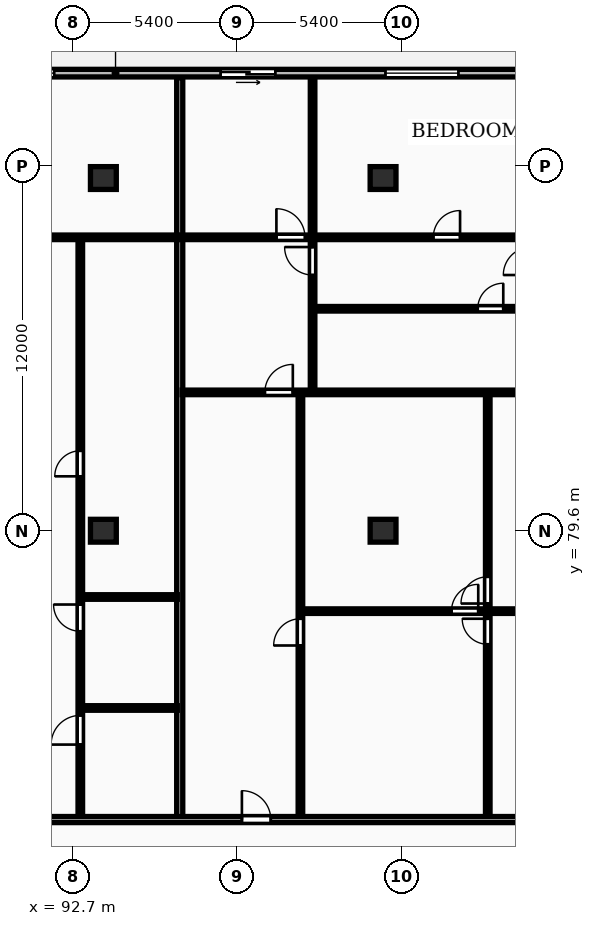
"""IFC4 building model, lengths in metres.
Left out: names, types, materials, properties, quantities, classifications, styles, units other than length and angle.
Written with IfcOpenShell. Run it as: python <this file> out.ifc"""

import sys

from ifc_helpers import new_model, si_unit, direction, frame, frame_2d, origin, origin_2d, place, context, subcontext, project, spatial, rectangle, extrude, element, fill, save


model = new_model("IFC4")
c1 = context("Model", 3, precision=1e-05, world=origin(), true_north=direction((0.0, 1.0)))
c2 = subcontext(c1, "Body", "Model", "MODEL_VIEW")
j1 = project(units=[si_unit("LENGTHUNIT", "METRE"), si_unit("PLANEANGLEUNIT", "RADIAN")], contexts=[c1])
p1 = place(None, origin())
s1 = spatial("IfcSite", under=j1, at=p1, CompositionType="ELEMENT")
p2 = place(p1, origin())
s2 = spatial("IfcBuilding", under=s1, at=p2, CompositionType="ELEMENT")
p3 = place(p2, frame((0.0, 0.0, 201.1)))
s3 = spatial("IfcBuildingStorey", under=s2, at=p3, CompositionType="ELEMENT", Elevation=201.1)
for number, where, z_axis, x_axis in (
    (1, (93.7, 79.6, 0.0), (0.0, 0.0, 1.0), (1.0, 0.0, 0.0)),
    (2, (93.7, 91.2, 0.0), (0.0, 0.0, 1.0), (1.0, 0.0, 0.0)),
    (3, (102.9, 79.6, 0.0), (0.0, 0.0, 1.0), (1.0, 0.0, 0.0)),
    (4, (102.9, 91.2, 0.0), (0.0, 0.0, 1.0), (1.0, 0.0, 0.0)),
):
    element("IfcColumn", number, at=place(p3, frame(where, z_axis=z_axis, x_axis=x_axis)), inside=s3, PredefinedType="COLUMN", context=c2, shape_type="SweptSolid", body=[
        extrude(rectangle(XDim=0.85, YDim=0.75, at=origin_2d()), origin(), (0.0, 0.0, 1.0), 3.25),
    ])
p4 = place(p3, frame((128.4, 94.65, 0.0), z_axis=(0.0, 0.0, 1.0), x_axis=(-1.0, 0.0, 0.0)))
e5 = element("IfcWall", 5, at=p4, inside=s3, PredefinedType="STANDARD", context=c2, shape_type="SweptSolid", body=[
    extrude(rectangle(XDim=68.6, YDim=0.25, at=frame_2d((34.3, 0.0))), origin(), (0.0, 0.0, 1.0), 2.97),
])
p5 = place(p4, frame((63.864, 0.0, 0.0)))
e6 = element("IfcOpeningElement", 6, at=p5, cuts=e5, PredefinedType="OPENING", context=c2, shape_type="SweptSolid", body=[
    extrude(rectangle(XDim=1.8, YDim=2.2, at=frame_2d((0.9, 1.1))), frame((0.0, 0.135, 0.0), z_axis=(0.0, -1.0, 0.0), x_axis=(1.0, 0.0, 0.0)), (0.0, 0.0, 1.0), 0.27),
])
p6 = place(p4, frame((54.713, 0.0, 0.85)))
e7 = element("IfcOpeningElement", 7, at=p6, cuts=e5, PredefinedType="OPENING", context=c2, shape_type="SweptSolid", body=[
    extrude(rectangle(XDim=2.4, YDim=1.9, at=frame_2d((1.2, 0.95))), frame((0.0, 0.135, 0.0), z_axis=(0.0, -1.0, 0.0), x_axis=(1.0, 0.0, 0.0)), (0.0, 0.0, 1.0), 0.27),
])
p7 = place(p4, frame((45.732, 0.0, 0.0)))
e8 = element("IfcOpeningElement", 8, at=p7, cuts=e5, PredefinedType="OPENING", context=c2, shape_type="SweptSolid", body=[
    extrude(rectangle(XDim=1.8, YDim=2.2, at=frame_2d((0.9, 1.1))), frame((0.0, 0.135, 0.0), z_axis=(0.0, -1.0, 0.0), x_axis=(1.0, 0.0, 0.0)), (0.0, 0.0, 1.0), 0.27),
])
p8 = place(p4, frame((36.318, 0.0, 0.85)))
e9 = element("IfcOpeningElement", 9, at=p8, cuts=e5, PredefinedType="OPENING", context=c2, shape_type="SweptSolid", body=[
    extrude(rectangle(XDim=2.4, YDim=1.9, at=frame_2d((1.2, 0.95))), frame((0.0, 0.135, 0.0), z_axis=(0.0, -1.0, 0.0), x_axis=(1.0, 0.0, 0.0)), (0.0, 0.0, 1.0), 0.27),
])
p9 = place(p4, frame((23.021, 0.0, 0.85)))
e10 = element("IfcOpeningElement", 10, at=p9, cuts=e5, PredefinedType="OPENING", context=c2, shape_type="SweptSolid", body=[
    extrude(rectangle(XDim=2.4, YDim=1.9, at=frame_2d((1.2, 0.95))), frame((0.0, 0.135, 0.0), z_axis=(0.0, -1.0, 0.0), x_axis=(1.0, 0.0, 0.0)), (0.0, 0.0, 1.0), 0.27),
])
p10 = place(p4, frame((29.043, 0.0, 0.0)))
e11 = element("IfcOpeningElement", 11, at=p10, cuts=e5, PredefinedType="OPENING", context=c2, shape_type="SweptSolid", body=[
    extrude(rectangle(XDim=1.8, YDim=2.2, at=frame_2d((0.9, 1.1))), frame((0.0, 0.135, 0.0), z_axis=(0.0, -1.0, 0.0), x_axis=(1.0, 0.0, 0.0)), (0.0, 0.0, 1.0), 0.27),
])
p11 = place(p4, frame((17.209, 0.0, 0.85)))
e12 = element("IfcOpeningElement", 12, at=p11, cuts=e5, PredefinedType="OPENING", context=c2, shape_type="SweptSolid", body=[
    extrude(rectangle(XDim=2.4, YDim=1.9, at=frame_2d((1.2, 0.95))), frame((0.0, 0.135, 0.0), z_axis=(0.0, -1.0, 0.0), x_axis=(1.0, 0.0, 0.0)), (0.0, 0.0, 1.0), 0.27),
])
p12 = place(p4, frame((6.712, 0.0, 0.85)))
e13 = element("IfcOpeningElement", 13, at=p12, cuts=e5, PredefinedType="OPENING", context=c2, shape_type="SweptSolid", body=[
    extrude(rectangle(XDim=2.4, YDim=1.9, at=frame_2d((1.2, 0.95))), frame((0.0, 0.135, 0.0), z_axis=(0.0, -1.0, 0.0), x_axis=(1.0, 0.0, 0.0)), (0.0, 0.0, 1.0), 0.27),
])
p13 = place(p4, frame((12.824, 0.0, 0.0)))
e14 = element("IfcOpeningElement", 14, at=p13, cuts=e5, PredefinedType="OPENING", context=c2, shape_type="SweptSolid", body=[
    extrude(rectangle(XDim=1.8, YDim=2.2, at=frame_2d((0.9, 1.1))), frame((0.0, 0.135, 0.0), z_axis=(0.0, -1.0, 0.0), x_axis=(1.0, 0.0, 0.0)), (0.0, 0.0, 1.0), 0.27),
])
p14 = place(p4, frame((1.025, 0.0, 0.85)))
e15 = element("IfcOpeningElement", 15, at=p14, cuts=e5, PredefinedType="OPENING", context=c2, shape_type="SweptSolid", body=[
    extrude(rectangle(XDim=2.4, YDim=1.9, at=frame_2d((1.2, 0.95))), frame((0.0, 0.135, 0.0), z_axis=(0.0, -1.0, 0.0), x_axis=(1.0, 0.0, 0.0)), (0.0, 0.0, 1.0), 0.27),
])
p15 = place(p3, frame((96.212, 70.18, 0.0), z_axis=(0.0, 0.0, 1.0), x_axis=(0.0, 1.0, 0.0)))
e16 = element("IfcWall", 16, at=p15, inside=s3, PredefinedType="PARTITIONING", context=c2, shape_type="SweptSolid", body=[
    extrude(rectangle(XDim=24.32, YDim=0.2, at=frame_2d((12.16, 0.0))), origin(), (0.0, 0.0, 1.0), 2.97),
])
for number, where, z_axis, x_axis in (
    (17, (93.002, 73.77, 0.0), (0.0, 0.0, 1.0), (1.0, 0.0, 0.0)),
    (18, (93.002, 77.42, 0.0), (0.0, 0.0, 1.0), (1.0, 0.0, 0.0)),
):
    element("IfcWall", number, at=place(p3, frame(where, z_axis=z_axis, x_axis=x_axis)), inside=s3, PredefinedType="PARTITIONING", context=c2, shape_type="SweptSolid", body=[
        extrude(rectangle(XDim=3.13, YDim=0.15, at=frame_2d((1.565, 0.0))), origin(), (0.0, 0.0, 1.0), 2.97),
    ])
p16 = place(p3, frame((92.942, 70.16, 0.0), z_axis=(0.0, 0.0, 1.0), x_axis=(0.0, 1.0, 0.0)))
e19 = element("IfcWall", 19, at=p16, inside=s3, PredefinedType="PARTITIONING", context=c2, shape_type="SweptSolid", body=[
    extrude(rectangle(XDim=19.03, YDim=0.15, at=frame_2d((9.515, 0.0))), origin(), (0.0, 0.0, 1.0), 2.97),
])
p17 = place(p16, frame((2.406, 0.0, 0.0)))
e20 = element("IfcOpeningElement", 20, at=p17, cuts=e19, PredefinedType="OPENING", context=c2, shape_type="SweptSolid", body=[
    extrude(rectangle(XDim=0.96, YDim=2.1, at=frame_2d((0.48, 1.05))), frame((0.0, 0.085, 0.0), z_axis=(0.0, -1.0, 0.0), x_axis=(1.0, 0.0, 0.0)), (0.0, 0.0, 1.0), 0.17),
])
p18 = place(p16, frame((6.133, 0.0, 0.0)))
e21 = element("IfcOpeningElement", 21, at=p18, cuts=e19, PredefinedType="OPENING", context=c2, shape_type="SweptSolid", body=[
    extrude(rectangle(XDim=0.88, YDim=2.06, at=frame_2d((0.44, 1.03))), frame((0.0, 0.085, 0.0), z_axis=(0.0, -1.0, 0.0), x_axis=(1.0, 0.0, 0.0)), (0.0, 0.0, 1.0), 0.17),
])
p19 = place(p16, frame((11.229, 0.0, 0.0)))
e22 = element("IfcOpeningElement", 22, at=p19, cuts=e19, PredefinedType="OPENING", context=c2, shape_type="SweptSolid", body=[
    extrude(rectangle(XDim=0.84, YDim=2.04, at=frame_2d((0.42, 1.02))), frame((0.0, 0.085, 0.0), z_axis=(0.0, -1.0, 0.0), x_axis=(1.0, 0.0, 0.0)), (0.0, 0.0, 1.0), 0.17),
])
p20 = place(p3, frame((77.823, 89.25, 0.0), z_axis=(0.0, 0.0, 1.0), x_axis=(1.0, 0.0, 0.0)))
e23 = element("IfcWall", 23, at=p20, inside=s3, PredefinedType="PARTITIONING", context=c2, shape_type="SweptSolid", body=[
    extrude(rectangle(XDim=18.308, YDim=0.15, at=frame_2d((9.154, 0.0))), origin(), (0.0, 0.0, 1.0), 2.97),
])
p21 = place(p20, frame((4.095, 0.0, 0.0)))
e24 = element("IfcOpeningElement", 24, at=p21, cuts=e23, PredefinedType="OPENING", context=c2, shape_type="SweptSolid", body=[
    extrude(rectangle(XDim=0.94, YDim=2.1, at=frame_2d((0.47, 1.05))), frame((0.0, 0.085, 0.0), z_axis=(0.0, -1.0, 0.0), x_axis=(1.0, 0.0, 0.0)), (0.0, 0.0, 1.0), 0.17),
])
p22 = place(p20, frame((8.684, 0.0, 0.0)))
e25 = element("IfcOpeningElement", 25, at=p22, cuts=e23, PredefinedType="OPENING", context=c2, shape_type="SweptSolid", body=[
    extrude(rectangle(XDim=0.94, YDim=2.1, at=frame_2d((0.47, 1.05))), frame((0.0, 0.085, 0.0), z_axis=(0.0, -1.0, 0.0), x_axis=(1.0, 0.0, 0.0)), (0.0, 0.0, 1.0), 0.17),
])
p23 = place(p3, frame((106.344, 70.16, 0.0), z_axis=(0.0, 0.0, 1.0), x_axis=(0.0, 1.0, 0.0)))
e26 = element("IfcWall", 26, at=p23, inside=s3, PredefinedType="PARTITIONING", context=c2, shape_type="SweptSolid", body=[
    extrude(rectangle(XDim=13.95, YDim=0.15, at=frame_2d((6.975, 0.0))), origin(), (0.0, 0.0, 1.0), 2.97),
])
p24 = place(p23, frame((5.705, 0.0, 0.0)))
e27 = element("IfcOpeningElement", 27, at=p24, cuts=e26, PredefinedType="OPENING", context=c2, shape_type="SweptSolid", body=[
    extrude(rectangle(XDim=0.84, YDim=2.04, at=frame_2d((0.42, 1.02))), frame((0.0, 0.085, 0.0), z_axis=(0.0, -1.0, 0.0), x_axis=(1.0, 0.0, 0.0)), (0.0, 0.0, 1.0), 0.17),
])
p25 = place(p23, frame((7.045, 0.0, 0.0)))
e28 = element("IfcOpeningElement", 28, at=p25, cuts=e26, PredefinedType="OPENING", context=c2, shape_type="SweptSolid", body=[
    extrude(rectangle(XDim=0.88, YDim=2.06, at=frame_2d((0.44, 1.03))), frame((0.0, 0.085, 0.0), z_axis=(0.0, -1.0, 0.0), x_axis=(1.0, 0.0, 0.0)), (0.0, 0.0, 1.0), 0.17),
])
p26 = place(p3, frame((100.242, 76.955, 0.0), z_axis=(0.0, 0.0, 1.0), x_axis=(1.0, 0.0, 0.0)))
e29 = element("IfcWall", 29, at=p26, inside=s3, PredefinedType="PARTITIONING", context=c2, shape_type="SweptSolid", body=[
    extrude(rectangle(XDim=12.004, YDim=0.15, at=frame_2d((6.002, 0.0))), origin(), (0.0, 0.0, 1.0), 2.97),
])
p27 = place(p26, frame((4.909, 0.0, 0.0)))
e30 = element("IfcOpeningElement", 30, at=p27, cuts=e29, PredefinedType="OPENING", context=c2, shape_type="SweptSolid", body=[
    extrude(rectangle(XDim=0.88, YDim=2.06, at=frame_2d((0.44, 1.03))), frame((0.0, 0.085, 0.0), z_axis=(0.0, -1.0, 0.0), x_axis=(1.0, 0.0, 0.0)), (0.0, 0.0, 1.0), 0.17),
])
p28 = place(p3, frame((100.182, 70.16, 0.0), z_axis=(0.0, 0.0, 1.0), x_axis=(0.0, 1.0, 0.0)))
e31 = element("IfcWall", 31, at=p28, inside=s3, PredefinedType="PARTITIONING", context=c2, shape_type="SweptSolid", body=[
    extrude(rectangle(XDim=13.95, YDim=0.15, at=frame_2d((6.975, 0.0))), origin(), (0.0, 0.0, 1.0), 2.97),
])
p29 = place(p28, frame((5.665, 0.0, 0.0)))
e32 = element("IfcOpeningElement", 32, at=p29, cuts=e31, PredefinedType="OPENING", context=c2, shape_type="SweptSolid", body=[
    extrude(rectangle(XDim=0.88, YDim=2.06, at=frame_2d((0.44, 1.03))), frame((0.0, 0.085, 0.0), z_axis=(0.0, -1.0, 0.0), x_axis=(1.0, 0.0, 0.0)), (0.0, 0.0, 1.0), 0.17),
])
p30 = place(p3, frame((100.582, 84.19, 0.0), z_axis=(0.0, 0.0, 1.0), x_axis=(0.0, 1.0, 0.0)))
e33 = element("IfcWall", 33, at=p30, inside=s3, PredefinedType="PARTITIONING", context=c2, shape_type="SweptSolid", body=[
    extrude(rectangle(XDim=10.31, YDim=0.15, at=frame_2d((5.155, 0.0))), origin(), (0.0, 0.0, 1.0), 2.97),
])
p31 = place(p30, frame((3.82, 0.0, 0.0)))
e34 = element("IfcOpeningElement", 34, at=p31, cuts=e33, PredefinedType="OPENING", context=c2, shape_type="SweptSolid", body=[
    extrude(rectangle(XDim=0.92, YDim=2.08, at=frame_2d((0.46, 1.04))), frame((0.0, 0.085, 0.0), z_axis=(0.0, -1.0, 0.0), x_axis=(1.0, 0.0, 0.0)), (0.0, 0.0, 1.0), 0.17),
])
p32 = place(p3, frame((100.622, 86.9, 0.0), z_axis=(0.0, 0.0, 1.0), x_axis=(1.0, 0.0, 0.0)))
e35 = element("IfcWall", 35, at=p32, inside=s3, PredefinedType="PARTITIONING", context=c2, shape_type="SweptSolid", body=[
    extrude(rectangle(XDim=11.624, YDim=0.15, at=frame_2d((5.812, 0.0))), origin(), (0.0, 0.0, 1.0), 2.97),
])
p33 = place(p32, frame((5.392, 0.0, 0.0)))
e36 = element("IfcOpeningElement", 36, at=p33, cuts=e35, PredefinedType="OPENING", context=c2, shape_type="SweptSolid", body=[
    extrude(rectangle(XDim=0.84, YDim=2.04, at=frame_2d((0.42, 1.02))), frame((0.0, 0.085, 0.0), z_axis=(0.0, -1.0, 0.0), x_axis=(1.0, 0.0, 0.0)), (0.0, 0.0, 1.0), 0.17),
])
p34 = place(p32, frame((7.404, 0.0, 0.0)))
e37 = element("IfcOpeningElement", 37, at=p34, cuts=e35, PredefinedType="OPENING", context=c2, shape_type="SweptSolid", body=[
    extrude(rectangle(XDim=0.84, YDim=2.04, at=frame_2d((0.42, 1.02))), frame((0.0, 0.085, 0.0), z_axis=(0.0, -1.0, 0.0), x_axis=(1.0, 0.0, 0.0)), (0.0, 0.0, 1.0), 0.17),
])
p35 = place(p3, frame((96.292, 84.15, 0.0), z_axis=(0.0, 0.0, 1.0), x_axis=(1.0, 0.0, 0.0)))
e38 = element("IfcWall", 38, at=p35, inside=s3, PredefinedType="PARTITIONING", context=c2, shape_type="SweptSolid", body=[
    extrude(rectangle(XDim=15.954, YDim=0.15, at=frame_2d((7.977, 0.0))), origin(), (0.0, 0.0, 1.0), 2.97),
])
p36 = place(p35, frame((2.72, 0.0, 0.0)))
e39 = element("IfcOpeningElement", 39, at=p36, cuts=e38, PredefinedType="OPENING", context=c2, shape_type="SweptSolid", body=[
    extrude(rectangle(XDim=0.92, YDim=2.08, at=frame_2d((0.46, 1.04))), frame((0.0, 0.085, 0.0), z_axis=(0.0, -1.0, 0.0), x_axis=(1.0, 0.0, 0.0)), (0.0, 0.0, 1.0), 0.17),
])
p37 = place(p3, frame((96.292, 89.25, 0.0), z_axis=(0.0, 0.0, 1.0), x_axis=(1.0, 0.0, 0.0)))
e40 = element("IfcWall", 40, at=p37, inside=s3, PredefinedType="PARTITIONING", context=c2, shape_type="SweptSolid", body=[
    extrude(rectangle(XDim=11.484, YDim=0.15, at=frame_2d((5.742, 0.0))), origin(), (0.0, 0.0, 1.0), 2.97),
])
p38 = place(p37, frame((3.1, 0.0, 0.0)))
e41 = element("IfcOpeningElement", 41, at=p38, cuts=e40, PredefinedType="OPENING", context=c2, shape_type="SweptSolid", body=[
    extrude(rectangle(XDim=0.94, YDim=2.1, at=frame_2d((0.47, 1.05))), frame((0.0, 0.085, 0.0), z_axis=(0.0, -1.0, 0.0), x_axis=(1.0, 0.0, 0.0)), (0.0, 0.0, 1.0), 0.17),
])
p39 = place(p37, frame((8.261, 0.0, 0.0)))
e42 = element("IfcOpeningElement", 42, at=p39, cuts=e40, PredefinedType="OPENING", context=c2, shape_type="SweptSolid", body=[
    extrude(rectangle(XDim=0.88, YDim=2.06, at=frame_2d((0.44, 1.03))), frame((0.0, 0.085, 0.0), z_axis=(0.0, -1.0, 0.0), x_axis=(1.0, 0.0, 0.0)), (0.0, 0.0, 1.0), 0.17),
])
p40 = place(p3, frame((59.8, 70.1, 0.0), z_axis=(0.0, 0.0, 1.0), x_axis=(1.0, 0.0, 0.0)))
e43 = element("IfcWall", 43, at=p40, inside=s3, PredefinedType="PARTITIONING", context=c2, shape_type="SweptSolid", body=[
    extrude(rectangle(XDim=68.6, YDim=0.2, at=frame_2d((34.3, 0.0))), origin(), (0.0, 0.0, 1.0), 2.97),
])
p41 = place(p40, frame((7.281, 0.0, 0.0)))
e44 = element("IfcOpeningElement", 44, at=p41, cuts=e43, PredefinedType="OPENING", context=c2, shape_type="SweptSolid", body=[
    extrude(rectangle(XDim=1.22, YDim=2.18, at=frame_2d((0.61, 1.09))), frame((0.0, 0.11, 0.0), z_axis=(0.0, -1.0, 0.0), x_axis=(1.0, 0.0, 0.0)), (0.0, 0.0, 1.0), 0.22),
])
p42 = place(p40, frame((25.602, 0.0, 0.0)))
e45 = element("IfcOpeningElement", 45, at=p42, cuts=e43, PredefinedType="OPENING", context=c2, shape_type="SweptSolid", body=[
    extrude(rectangle(XDim=1.22, YDim=2.18, at=frame_2d((0.61, 1.09))), frame((0.0, 0.11, 0.0), z_axis=(0.0, -1.0, 0.0), x_axis=(1.0, 0.0, 0.0)), (0.0, 0.0, 1.0), 0.22),
])
p43 = place(p40, frame((38.457, 0.0, 0.0)))
e46 = element("IfcOpeningElement", 46, at=p43, cuts=e43, PredefinedType="OPENING", context=c2, shape_type="SweptSolid", body=[
    extrude(rectangle(XDim=0.95, YDim=2.15, at=frame_2d((0.475, 1.075))), frame((0.0, 0.11, 0.0), z_axis=(0.0, -1.0, 0.0), x_axis=(1.0, 0.0, 0.0)), (0.0, 0.0, 1.0), 0.22),
])
p44 = place(p40, frame((54.571, 0.0, 0.0)))
e47 = element("IfcOpeningElement", 47, at=p44, cuts=e43, PredefinedType="OPENING", context=c2, shape_type="SweptSolid", body=[
    extrude(rectangle(XDim=0.95, YDim=2.15, at=frame_2d((0.475, 1.075))), frame((0.0, 0.11, 0.0), z_axis=(0.0, -1.0, 0.0), x_axis=(1.0, 0.0, 0.0)), (0.0, 0.0, 1.0), 0.22),
])
p45 = place(p8, origin())
e48 = element("IfcWindow", 48, at=p45, inside=s3, PartitioningType="DOUBLE_PANEL_VERTICAL", PredefinedType="WINDOW", context=c2, shape_type="SweptSolid", body=[
    extrude(rectangle(XDim=2.4, YDim=1.9, at=frame_2d((1.2, 0.95))), frame((0.0, 0.03, 0.0), z_axis=(0.0, -1.0, 0.0), x_axis=(1.0, 0.0, 0.0)), (0.0, 0.0, 1.0), 0.06),
])
fill(e9, e48)
p46 = place(p9, origin())
e49 = element("IfcWindow", 49, at=p46, inside=s3, PartitioningType="DOUBLE_PANEL_VERTICAL", PredefinedType="WINDOW", context=c2, shape_type="SweptSolid", body=[
    extrude(rectangle(XDim=2.4, YDim=1.9, at=frame_2d((1.2, 0.95))), frame((0.0, 0.03, 0.0), z_axis=(0.0, -1.0, 0.0), x_axis=(1.0, 0.0, 0.0)), (0.0, 0.0, 1.0), 0.06),
])
fill(e10, e49)
p47 = place(p10, origin())
e50 = element("IfcDoor", 50, at=p47, inside=s3, OperationType="SLIDING_TO_LEFT", PredefinedType="DOOR", context=c2, shape_type="SweptSolid", body=[
    extrude(rectangle(XDim=1.8, YDim=2.2, at=frame_2d((0.9, 1.1))), frame((0.0, 0.025, 0.0), z_axis=(0.0, -1.0, 0.0), x_axis=(1.0, 0.0, 0.0)), (0.0, 0.0, 1.0), 0.05),
])
fill(e11, e50)
p48 = place(p17, origin())
e51 = element("IfcDoor", 51, at=p48, inside=s3, OperationType="SINGLE_SWING_LEFT", PredefinedType="DOOR", context=c2, shape_type="SweptSolid", body=[
    extrude(rectangle(XDim=0.96, YDim=2.1, at=frame_2d((0.48, 1.05))), frame((0.0, 0.025, 0.0), z_axis=(0.0, -1.0, 0.0), x_axis=(1.0, 0.0, 0.0)), (0.0, 0.0, 1.0), 0.05),
])
fill(e20, e51)
p49 = place(p18, origin())
e52 = element("IfcDoor", 52, at=p49, inside=s3, OperationType="SINGLE_SWING_RIGHT", PredefinedType="DOOR", context=c2, shape_type="SweptSolid", body=[
    extrude(rectangle(XDim=0.88, YDim=2.06, at=frame_2d((0.44, 1.03))), frame((0.0, 0.025, 0.0), z_axis=(0.0, -1.0, 0.0), x_axis=(1.0, 0.0, 0.0)), (0.0, 0.0, 1.0), 0.05),
])
fill(e21, e52)
p50 = place(p19, origin())
e53 = element("IfcDoor", 53, at=p50, inside=s3, OperationType="SINGLE_SWING_LEFT", PredefinedType="DOOR", context=c2, shape_type="SweptSolid", body=[
    extrude(rectangle(XDim=0.84, YDim=2.04, at=frame_2d((0.42, 1.02))), frame((0.0, 0.025, 0.0), z_axis=(0.0, -1.0, 0.0), x_axis=(1.0, 0.0, 0.0)), (0.0, 0.0, 1.0), 0.05),
])
fill(e22, e53)
p51 = place(p24, origin())
e54 = element("IfcDoor", 54, at=p51, inside=s3, OperationType="SINGLE_SWING_RIGHT", PredefinedType="DOOR", context=c2, shape_type="SweptSolid", body=[
    extrude(rectangle(XDim=0.84, YDim=2.04, at=frame_2d((0.42, 1.02))), frame((0.0, 0.025, 0.0), z_axis=(0.0, -1.0, 0.0), x_axis=(1.0, 0.0, 0.0)), (0.0, 0.0, 1.0), 0.05),
])
fill(e27, e54)
p52 = place(p25, origin())
e55 = element("IfcDoor", 55, at=p52, inside=s3, OperationType="SINGLE_SWING_LEFT", PredefinedType="DOOR", context=c2, shape_type="SweptSolid", body=[
    extrude(rectangle(XDim=0.88, YDim=2.06, at=frame_2d((0.44, 1.03))), frame((0.0, 0.025, 0.0), z_axis=(0.0, -1.0, 0.0), x_axis=(1.0, 0.0, 0.0)), (0.0, 0.0, 1.0), 0.05),
])
fill(e28, e55)
p53 = place(p27, origin())
e56 = element("IfcDoor", 56, at=p53, inside=s3, OperationType="SINGLE_SWING_RIGHT", PredefinedType="DOOR", context=c2, shape_type="SweptSolid", body=[
    extrude(rectangle(XDim=0.88, YDim=2.06, at=frame_2d((0.44, 1.03))), frame((0.0, 0.025, 0.0), z_axis=(0.0, -1.0, 0.0), x_axis=(1.0, 0.0, 0.0)), (0.0, 0.0, 1.0), 0.05),
])
fill(e30, e56)
p54 = place(p29, origin())
e57 = element("IfcDoor", 57, at=p54, inside=s3, OperationType="SINGLE_SWING_LEFT", PredefinedType="DOOR", context=c2, shape_type="SweptSolid", body=[
    extrude(rectangle(XDim=0.88, YDim=2.06, at=frame_2d((0.44, 1.03))), frame((0.0, 0.025, 0.0), z_axis=(0.0, -1.0, 0.0), x_axis=(1.0, 0.0, 0.0)), (0.0, 0.0, 1.0), 0.05),
])
fill(e32, e57)
p55 = place(p31, origin())
e58 = element("IfcDoor", 58, at=p55, inside=s3, OperationType="SINGLE_SWING_RIGHT", PredefinedType="DOOR", context=c2, shape_type="SweptSolid", body=[
    extrude(rectangle(XDim=0.92, YDim=2.08, at=frame_2d((0.46, 1.04))), frame((0.0, 0.025, 0.0), z_axis=(0.0, -1.0, 0.0), x_axis=(1.0, 0.0, 0.0)), (0.0, 0.0, 1.0), 0.05),
])
fill(e34, e58)
p56 = place(p33, origin())
e59 = element("IfcDoor", 59, at=p56, inside=s3, OperationType="SINGLE_SWING_RIGHT", PredefinedType="DOOR", context=c2, shape_type="SweptSolid", body=[
    extrude(rectangle(XDim=0.84, YDim=2.04, at=frame_2d((0.42, 1.02))), frame((0.0, 0.025, 0.0), z_axis=(0.0, -1.0, 0.0), x_axis=(1.0, 0.0, 0.0)), (0.0, 0.0, 1.0), 0.05),
])
fill(e36, e59)
p57 = place(p36, origin())
e60 = element("IfcDoor", 60, at=p57, inside=s3, OperationType="SINGLE_SWING_RIGHT", PredefinedType="DOOR", context=c2, shape_type="SweptSolid", body=[
    extrude(rectangle(XDim=0.92, YDim=2.08, at=frame_2d((0.46, 1.04))), frame((0.0, 0.025, 0.0), z_axis=(0.0, -1.0, 0.0), x_axis=(1.0, 0.0, 0.0)), (0.0, 0.0, 1.0), 0.05),
])
fill(e39, e60)
p58 = place(p38, origin())
e61 = element("IfcDoor", 61, at=p58, inside=s3, OperationType="SINGLE_SWING_LEFT", PredefinedType="DOOR", context=c2, shape_type="SweptSolid", body=[
    extrude(rectangle(XDim=0.94, YDim=2.1, at=frame_2d((0.47, 1.05))), frame((0.0, 0.025, 0.0), z_axis=(0.0, -1.0, 0.0), x_axis=(1.0, 0.0, 0.0)), (0.0, 0.0, 1.0), 0.05),
])
fill(e41, e61)
p59 = place(p39, origin())
e62 = element("IfcDoor", 62, at=p59, inside=s3, OperationType="SINGLE_SWING_RIGHT", PredefinedType="DOOR", context=c2, shape_type="SweptSolid", body=[
    extrude(rectangle(XDim=0.88, YDim=2.06, at=frame_2d((0.44, 1.03))), frame((0.0, 0.025, 0.0), z_axis=(0.0, -1.0, 0.0), x_axis=(1.0, 0.0, 0.0)), (0.0, 0.0, 1.0), 0.05),
])
fill(e42, e62)
p60 = place(p43, origin())
e63 = element("IfcDoor", 63, at=p60, inside=s3, OperationType="SINGLE_SWING_LEFT", PredefinedType="DOOR", context=c2, shape_type="SweptSolid", body=[
    extrude(rectangle(XDim=0.95, YDim=2.15, at=frame_2d((0.475, 1.075))), frame((0.0, 0.025, 0.0), z_axis=(0.0, -1.0, 0.0), x_axis=(1.0, 0.0, 0.0)), (0.0, 0.0, 1.0), 0.05),
])
fill(e46, e63)
save(model, sys.argv[1])
